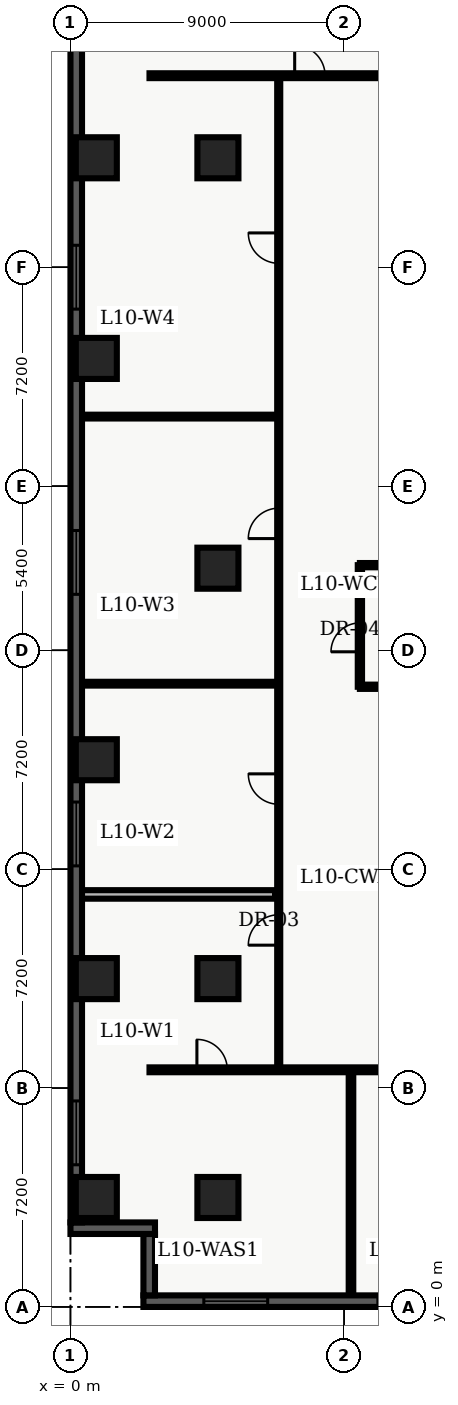
"""IFC4 building model, lengths in metres.
Left out: names, types, materials, properties, quantities, classifications, styles, units other than length and angle.
Written with IfcOpenShell. Run it as: python <this file> out.ifc"""

import sys

from ifc_helpers import new_model, entity, si_unit, converted_unit, direction, frame, origin_with_axes, origin_2d_with_axis, place, context, subcontext, project, spatial, polyline, rectangle, outline, extrude, element, fill, save


model = new_model("IFC4")
c1 = context("Model", 3, precision=1e-05, world=origin_with_axes(), true_north=direction((0.0, 1.0)))
c2 = subcontext(c1, "Body", "Model", "MODEL_VIEW")
j1 = project(units=[si_unit("LENGTHUNIT", "METRE"), converted_unit("PLANEANGLEUNIT", "DEGREE", entity("IfcPlaneAngleMeasure", 0.017), si_unit("PLANEANGLEUNIT", "RADIAN"), dimensions=[0, 0, 0, 0, 0, 0, 0])], contexts=[c1])
p1 = place(None, origin_with_axes())
s1 = spatial("IfcSite", under=j1, at=p1, CompositionType="ELEMENT")
p2 = place(p1, origin_with_axes())
s2 = spatial("IfcBuilding", under=s1, at=p2, CompositionType="ELEMENT")
p3 = place(p2, frame((0.0, 0.0, 44.4), z_axis=(0.0, 0.0, 1.0), x_axis=(1.0, 0.0, 0.0)))
s3 = spatial("IfcBuildingStorey", under=s2, at=p3, CompositionType="ELEMENT", Elevation=44.4)
for number, where, z_axis, x_axis in (
    (1, (4.85, 3.6, 0.0), (0.0, 0.0, 1.0), (1.0, 0.0, 0.0)),
    (2, (4.85, 10.8, 0.0), (0.0, 0.0, 1.0), (1.0, 0.0, 0.0)),
    (3, (4.85, 24.3, 0.0), (0.0, 0.0, 1.0), (1.0, 0.0, 0.0)),
    (4, (4.85, 37.8, 0.0), (0.0, 0.0, 1.0), (1.0, 0.0, 0.0)),
    (5, (0.85, 3.6, 0.0), (0.0, 0.0, 1.0), (1.0, 0.0, 0.0)),
    (6, (0.85, 10.8, 0.0), (0.0, 0.0, 1.0), (1.0, 0.0, 0.0)),
    (7, (0.85, 18.0, 0.0), (0.0, 0.0, 1.0), (1.0, 0.0, 0.0)),
    (8, (0.85, 31.2, 0.0), (0.0, 0.0, 1.0), (1.0, 0.0, 0.0)),
    (9, (0.85, 37.8, 0.0), (0.0, 0.0, 1.0), (1.0, 0.0, 0.0)),
):
    element("IfcColumn", number, at=place(p3, frame(where, z_axis=z_axis, x_axis=x_axis)), inside=s3, PredefinedType="COLUMN", context=c2, shape_type="SweptSolid", body=[
        extrude(rectangle(XDim=1.35, YDim=1.35, at=origin_2d_with_axis()), origin_with_axes(), (0.0, 0.0, 1.0), 3.9),
    ])
p4 = place(p3, frame((9.52, 20.4, 0.0), z_axis=(0.0, 0.0, 1.0), x_axis=(0.0, 1.0, 0.0)))
e10 = element("IfcWall", 10, at=p4, inside=s3, PredefinedType="PARTITIONING", context=c2, shape_type="SweptSolid", body=[
    extrude(outline(polyline([(0.0, -0.07), (4.0, -0.07), (4.0, 0.07), (0.0, 0.07), (0.0, -0.07)])), origin_with_axes(), (0.0, 0.0, 1.0), 2.7),
])
p5 = place(p4, frame((1.625, 0.0, 0.0), z_axis=(0.0, 0.0, 1.0), x_axis=(1.0, 0.0, 0.0)))
e11 = element("IfcOpeningElement", 11, at=p5, cuts=e10, PredefinedType="OPENING", context=c2, shape_type="SweptSolid", body=[
    extrude(rectangle(XDim=0.95, YDim=0.16, at=origin_2d_with_axis()), origin_with_axes(), (0.0, 0.0, 1.0), 2.15),
])
for number, where, z_axis, x_axis in (
    (12, (9.52, 20.4, 0.0), (0.0, 0.0, 1.0), (1.0, 0.0, 0.0)),
    (13, (9.52, 24.4, 0.0), (0.0, 0.0, 1.0), (1.0, 0.0, 0.0)),
):
    element("IfcWall", number, at=place(p3, frame(where, z_axis=z_axis, x_axis=x_axis)), inside=s3, PredefinedType="PARTITIONING", context=c2, shape_type="SweptSolid", body=[
        extrude(outline(polyline([(0.0, -0.07), (1.58, -0.07), (1.58, 0.07), (0.0, 0.07), (0.0, -0.07)])), origin_with_axes(), (0.0, 0.0, 1.0), 2.7),
    ])
p6 = place(p3, frame((2.6, 7.8, 0.0), z_axis=(0.0, 0.0, 1.0), x_axis=(1.0, 0.0, 0.0)))
e14 = element("IfcWall", 14, at=p6, inside=s3, PredefinedType="PARTITIONING", context=c2, shape_type="SweptSolid", body=[
    extrude(outline(polyline([(0.0, -0.08), (18.55, -0.08), (18.55, 0.08), (0.0, 0.08), (0.0, -0.08)])), origin_with_axes(), (0.0, 0.0, 1.0), 2.7),
])
p7 = place(p6, frame((2.059, 0.0, 0.0), z_axis=(0.0, 0.0, 1.0), x_axis=(1.0, 0.0, 0.0)))
e15 = element("IfcOpeningElement", 15, at=p7, cuts=e14, PredefinedType="OPENING", context=c2, shape_type="SweptSolid", body=[
    extrude(rectangle(XDim=1.0, YDim=0.18, at=origin_2d_with_axis()), origin_with_axes(), (0.0, 0.0, 1.0), 2.15),
])
p8 = place(p6, frame((10.516, 0.0, 0.0), z_axis=(0.0, 0.0, 1.0), x_axis=(1.0, 0.0, 0.0)))
e16 = element("IfcOpeningElement", 16, at=p8, cuts=e14, PredefinedType="OPENING", context=c2, shape_type="SweptSolid", body=[
    extrude(rectangle(XDim=1.2, YDim=0.18, at=origin_2d_with_axis()), origin_with_axes(), (0.0, 0.0, 1.0), 2.2),
])
p9 = place(p6, frame((16.453, 0.0, 0.0), z_axis=(0.0, 0.0, 1.0), x_axis=(1.0, 0.0, 0.0)))
e17 = element("IfcOpeningElement", 17, at=p9, cuts=e14, PredefinedType="OPENING", context=c2, shape_type="SweptSolid", body=[
    extrude(rectangle(XDim=1.0, YDim=0.18, at=origin_2d_with_axis()), origin_with_axes(), (0.0, 0.0, 1.0), 2.15),
])
p10 = place(p3, frame((2.6, 40.5, 0.0), z_axis=(0.0, 0.0, 1.0), x_axis=(1.0, 0.0, 0.0)))
e18 = element("IfcWall", 18, at=p10, inside=s3, PredefinedType="PARTITIONING", context=c2, shape_type="SweptSolid", body=[
    extrude(outline(polyline([(0.0, -0.08), (18.65, -0.08), (18.65, 0.08), (0.0, 0.08), (0.0, -0.08)])), origin_with_axes(), (0.0, 0.0, 1.0), 2.7),
])
p11 = place(p10, frame((5.275, 0.0, 0.0), z_axis=(0.0, 0.0, 1.0), x_axis=(1.0, 0.0, 0.0)))
e19 = element("IfcOpeningElement", 19, at=p11, cuts=e18, PredefinedType="OPENING", context=c2, shape_type="SweptSolid", body=[
    extrude(rectangle(XDim=1.0, YDim=0.18, at=origin_2d_with_axis()), origin_with_axes(), (0.0, 0.0, 1.0), 2.15),
])
p12 = place(p10, frame((12.61, 0.0, 0.0), z_axis=(0.0, 0.0, 1.0), x_axis=(1.0, 0.0, 0.0)))
e20 = element("IfcOpeningElement", 20, at=p12, cuts=e18, PredefinedType="OPENING", context=c2, shape_type="SweptSolid", body=[
    extrude(rectangle(XDim=1.2, YDim=0.18, at=origin_2d_with_axis()), origin_with_axes(), (0.0, 0.0, 1.0), 2.2),
])
p13 = place(p3, frame((6.85, 7.8, 0.0), z_axis=(0.0, 0.0, 1.0), x_axis=(0.0, 1.0, 0.0)))
e21 = element("IfcWall", 21, at=p13, inside=s3, PredefinedType="PARTITIONING", context=c2, shape_type="SweptSolid", body=[
    extrude(outline(polyline([(0.0, -0.05), (32.7, -0.05), (32.7, 0.05), (0.0, 0.05), (0.0, -0.05)])), origin_with_axes(), (0.0, 0.0, 1.0), 2.7),
])
p14 = place(p13, frame((4.6, 0.0, 0.0), z_axis=(0.0, 0.0, 1.0), x_axis=(1.0, 0.0, 0.0)))
e22 = element("IfcOpeningElement", 22, at=p14, cuts=e21, PredefinedType="OPENING", context=c2, shape_type="SweptSolid", body=[
    extrude(rectangle(XDim=1.0, YDim=0.12, at=origin_2d_with_axis()), origin_with_axes(), (0.0, 0.0, 1.0), 2.15),
])
p15 = place(p13, frame((9.235, 0.0, 0.0), z_axis=(0.0, 0.0, 1.0), x_axis=(1.0, 0.0, 0.0)))
e23 = element("IfcOpeningElement", 23, at=p15, cuts=e21, PredefinedType="OPENING", context=c2, shape_type="SweptSolid", body=[
    extrude(rectangle(XDim=1.0, YDim=0.12, at=origin_2d_with_axis()), origin_with_axes(), (0.0, 0.0, 1.0), 2.15),
])
p16 = place(p13, frame((17.974, 0.0, 0.0), z_axis=(0.0, 0.0, 1.0), x_axis=(1.0, 0.0, 0.0)))
e24 = element("IfcOpeningElement", 24, at=p16, cuts=e21, PredefinedType="OPENING", context=c2, shape_type="SweptSolid", body=[
    extrude(rectangle(XDim=1.0, YDim=0.12, at=origin_2d_with_axis()), origin_with_axes(), (0.0, 0.0, 1.0), 2.15),
])
p17 = place(p13, frame((27.029, 0.0, 0.0), z_axis=(0.0, 0.0, 1.0), x_axis=(1.0, 0.0, 0.0)))
e25 = element("IfcOpeningElement", 25, at=p17, cuts=e21, PredefinedType="OPENING", context=c2, shape_type="SweptSolid", body=[
    extrude(rectangle(XDim=1.0, YDim=0.12, at=origin_2d_with_axis()), origin_with_axes(), (0.0, 0.0, 1.0), 2.15),
])
p18 = place(p3, frame((0.375, 13.569, 0.0), z_axis=(0.0, 0.0, 1.0), x_axis=(1.0, 0.0, 0.0)))
e26 = element("IfcWall", 26, at=p18, inside=s3, PredefinedType="PARTITIONING", context=c2, shape_type="SweptSolid", body=[
    extrude(outline(polyline([(0.0, -0.14), (6.355, -0.14), (6.355, 0.14), (0.0, 0.14), (0.0, -0.14)])), origin_with_axes(), (0.0, 0.0, 1.0), 2.7),
])
for number, where, z_axis, x_axis in (
    (27, (0.375, 20.501, 0.0), (0.0, 0.0, 1.0), (1.0, 0.0, 0.0)),
    (28, (0.375, 29.287, 0.0), (0.0, 0.0, 1.0), (1.0, 0.0, 0.0)),
):
    element("IfcWall", number, at=place(p3, frame(where, z_axis=z_axis, x_axis=x_axis)), inside=s3, PredefinedType="PARTITIONING", context=c2, shape_type="SweptSolid", body=[
        extrude(outline(polyline([(0.0, -0.062), (6.355, -0.062), (6.355, 0.062), (0.0, 0.062), (0.0, -0.062)])), origin_with_axes(), (0.0, 0.0, 1.0), 2.7),
    ])
p19 = place(p3, frame((9.227, 0.36, 0.0), z_axis=(0.0, 0.0, 1.0), x_axis=(0.0, 1.0, 0.0)))
e29 = element("IfcWall", 29, at=p19, inside=s3, PredefinedType="PARTITIONING", context=c2, shape_type="SweptSolid", body=[
    extrude(outline(polyline([(0.0, -0.075), (7.34, -0.075), (7.34, 0.075), (0.0, 0.075), (0.0, -0.075)])), origin_with_axes(), (0.0, 0.0, 1.0), 2.7),
])
p20 = place(p3, frame((57.22, 0.19, 0.0), z_axis=(0.0, 0.0, 1.0), x_axis=(-1.0, 0.0, 0.0)))
e30 = element("IfcWall", 30, at=p20, inside=s3, PredefinedType="SOLIDWALL", context=c2, shape_type="SweptSolid", body=[
    extrude(outline(polyline([(0.0, -0.19), (54.82, -0.19), (54.82, 0.19), (0.0, 0.19), (0.0, -0.19)])), origin_with_axes(), (0.0, 0.0, 1.0), 3.66),
])
p21 = place(p20, frame((3.037, 0.0, 0.45), z_axis=(0.0, 0.0, 1.0), x_axis=(1.0, 0.0, 0.0)))
e31 = element("IfcOpeningElement", 31, at=p21, cuts=e30, PredefinedType="OPENING", context=c2, shape_type="SweptSolid", body=[
    extrude(rectangle(XDim=2.1, YDim=0.4, at=origin_2d_with_axis()), origin_with_axes(), (0.0, 0.0, 1.0), 2.2),
])
p22 = place(p20, frame((7.912, 0.0, 0.45), z_axis=(0.0, 0.0, 1.0), x_axis=(1.0, 0.0, 0.0)))
e32 = element("IfcOpeningElement", 32, at=p22, cuts=e30, PredefinedType="OPENING", context=c2, shape_type="SweptSolid", body=[
    extrude(rectangle(XDim=2.1, YDim=0.4, at=origin_2d_with_axis()), origin_with_axes(), (0.0, 0.0, 1.0), 2.2),
])
p23 = place(p20, frame((12.786, 0.0, 0.45), z_axis=(0.0, 0.0, 1.0), x_axis=(1.0, 0.0, 0.0)))
e33 = element("IfcOpeningElement", 33, at=p23, cuts=e30, PredefinedType="OPENING", context=c2, shape_type="SweptSolid", body=[
    extrude(rectangle(XDim=2.1, YDim=0.4, at=origin_2d_with_axis()), origin_with_axes(), (0.0, 0.0, 1.0), 2.2),
])
p24 = place(p20, frame((17.661, 0.0, 0.45), z_axis=(0.0, 0.0, 1.0), x_axis=(1.0, 0.0, 0.0)))
e34 = element("IfcOpeningElement", 34, at=p24, cuts=e30, PredefinedType="OPENING", context=c2, shape_type="SweptSolid", body=[
    extrude(rectangle(XDim=2.1, YDim=0.4, at=origin_2d_with_axis()), origin_with_axes(), (0.0, 0.0, 1.0), 2.2),
])
p25 = place(p20, frame((22.535, 0.0, 0.45), z_axis=(0.0, 0.0, 1.0), x_axis=(1.0, 0.0, 0.0)))
e35 = element("IfcOpeningElement", 35, at=p25, cuts=e30, PredefinedType="OPENING", context=c2, shape_type="SweptSolid", body=[
    extrude(rectangle(XDim=2.1, YDim=0.4, at=origin_2d_with_axis()), origin_with_axes(), (0.0, 0.0, 1.0), 2.2),
])
p26 = place(p20, frame((27.41, 0.0, 0.45), z_axis=(0.0, 0.0, 1.0), x_axis=(1.0, 0.0, 0.0)))
e36 = element("IfcOpeningElement", 36, at=p26, cuts=e30, PredefinedType="OPENING", context=c2, shape_type="SweptSolid", body=[
    extrude(rectangle(XDim=2.1, YDim=0.4, at=origin_2d_with_axis()), origin_with_axes(), (0.0, 0.0, 1.0), 2.2),
])
p27 = place(p20, frame((32.285, 0.0, 0.45), z_axis=(0.0, 0.0, 1.0), x_axis=(1.0, 0.0, 0.0)))
e37 = element("IfcOpeningElement", 37, at=p27, cuts=e30, PredefinedType="OPENING", context=c2, shape_type="SweptSolid", body=[
    extrude(rectangle(XDim=2.1, YDim=0.4, at=origin_2d_with_axis()), origin_with_axes(), (0.0, 0.0, 1.0), 2.2),
])
p28 = place(p20, frame((37.159, 0.0, 0.45), z_axis=(0.0, 0.0, 1.0), x_axis=(1.0, 0.0, 0.0)))
e38 = element("IfcOpeningElement", 38, at=p28, cuts=e30, PredefinedType="OPENING", context=c2, shape_type="SweptSolid", body=[
    extrude(rectangle(XDim=2.1, YDim=0.4, at=origin_2d_with_axis()), origin_with_axes(), (0.0, 0.0, 1.0), 2.2),
])
p29 = place(p20, frame((42.034, 0.0, 0.45), z_axis=(0.0, 0.0, 1.0), x_axis=(1.0, 0.0, 0.0)))
e39 = element("IfcOpeningElement", 39, at=p29, cuts=e30, PredefinedType="OPENING", context=c2, shape_type="SweptSolid", body=[
    extrude(rectangle(XDim=2.1, YDim=0.4, at=origin_2d_with_axis()), origin_with_axes(), (0.0, 0.0, 1.0), 2.2),
])
p30 = place(p20, frame((46.058, 0.0, 0.45), z_axis=(0.0, 0.0, 1.0), x_axis=(1.0, 0.0, 0.0)))
e40 = element("IfcOpeningElement", 40, at=p30, cuts=e30, PredefinedType="OPENING", context=c2, shape_type="SweptSolid", body=[
    extrude(rectangle(XDim=2.1, YDim=0.4, at=origin_2d_with_axis()), origin_with_axes(), (0.0, 0.0, 1.0), 2.2),
])
p31 = place(p20, frame((51.783, 0.0, 0.45), z_axis=(0.0, 0.0, 1.0), x_axis=(1.0, 0.0, 0.0)))
e41 = element("IfcOpeningElement", 41, at=p31, cuts=e30, PredefinedType="OPENING", context=c2, shape_type="SweptSolid", body=[
    extrude(rectangle(XDim=2.1, YDim=0.4, at=origin_2d_with_axis()), origin_with_axes(), (0.0, 0.0, 1.0), 2.2),
])
p32 = place(p3, frame((2.59, 0.38, 0.0), z_axis=(0.0, 0.0, 1.0), x_axis=(0.0, 1.0, 0.0)))
e42 = element("IfcWall", 42, at=p32, inside=s3, PredefinedType="SOLIDWALL", context=c2, shape_type="SweptSolid", body=[
    extrude(outline(polyline([(0.0, -0.19), (2.02, -0.19), (2.02, 0.19), (0.0, 0.19), (0.0, -0.19)])), origin_with_axes(), (0.0, 0.0, 1.0), 3.66),
])
p33 = place(p3, frame((2.78, 2.59, 0.0), z_axis=(0.0, 0.0, 1.0), x_axis=(-1.0, 0.0, 0.0)))
e43 = element("IfcWall", 43, at=p33, inside=s3, PredefinedType="SOLIDWALL", context=c2, shape_type="SweptSolid", body=[
    extrude(outline(polyline([(0.0, -0.19), (2.78, -0.19), (2.78, 0.19), (0.0, 0.19), (0.0, -0.19)])), origin_with_axes(), (0.0, 0.0, 1.0), 3.66),
])
p34 = place(p3, frame((0.19, 2.78, 0.0), z_axis=(0.0, 0.0, 1.0), x_axis=(0.0, 1.0, 0.0)))
e44 = element("IfcWall", 44, at=p34, inside=s3, PredefinedType="SOLIDWALL", context=c2, shape_type="SweptSolid", body=[
    extrude(outline(polyline([(0.0, -0.19), (43.42, -0.19), (43.42, 0.19), (0.0, 0.19), (0.0, -0.19)])), origin_with_axes(), (0.0, 0.0, 1.0), 3.66),
])
p35 = place(p34, frame((2.946, 0.0, 0.45), z_axis=(0.0, 0.0, 1.0), x_axis=(1.0, 0.0, 0.0)))
e45 = element("IfcOpeningElement", 45, at=p35, cuts=e44, PredefinedType="OPENING", context=c2, shape_type="SweptSolid", body=[
    extrude(rectangle(XDim=2.1, YDim=0.4, at=origin_2d_with_axis()), origin_with_axes(), (0.0, 0.0, 1.0), 2.2),
])
p36 = place(p34, frame((12.778, 0.0, 0.45), z_axis=(0.0, 0.0, 1.0), x_axis=(1.0, 0.0, 0.0)))
e46 = element("IfcOpeningElement", 46, at=p36, cuts=e44, PredefinedType="OPENING", context=c2, shape_type="SweptSolid", body=[
    extrude(rectangle(XDim=2.1, YDim=0.4, at=origin_2d_with_axis()), origin_with_axes(), (0.0, 0.0, 1.0), 2.2),
])
p37 = place(p34, frame((21.71, 0.0, 0.45), z_axis=(0.0, 0.0, 1.0), x_axis=(1.0, 0.0, 0.0)))
e47 = element("IfcOpeningElement", 47, at=p37, cuts=e44, PredefinedType="OPENING", context=c2, shape_type="SweptSolid", body=[
    extrude(rectangle(XDim=2.1, YDim=0.4, at=origin_2d_with_axis()), origin_with_axes(), (0.0, 0.0, 1.0), 2.2),
])
p38 = place(p34, frame((31.092, 0.0, 0.45), z_axis=(0.0, 0.0, 1.0), x_axis=(1.0, 0.0, 0.0)))
e48 = element("IfcOpeningElement", 48, at=p38, cuts=e44, PredefinedType="OPENING", context=c2, shape_type="SweptSolid", body=[
    extrude(rectangle(XDim=2.1, YDim=0.4, at=origin_2d_with_axis()), origin_with_axes(), (0.0, 0.0, 1.0), 2.2),
])
p39 = place(p34, frame((40.024, 0.0, 0.45), z_axis=(0.0, 0.0, 1.0), x_axis=(1.0, 0.0, 0.0)))
e49 = element("IfcOpeningElement", 49, at=p39, cuts=e44, PredefinedType="OPENING", context=c2, shape_type="SweptSolid", body=[
    extrude(rectangle(XDim=2.1, YDim=0.4, at=origin_2d_with_axis()), origin_with_axes(), (0.0, 0.0, 1.0), 2.2),
])
p40 = place(p4, frame((1.625, 0.0, 0.0), z_axis=(0.0, 0.0, 1.0), x_axis=(1.0, 0.0, 0.0)))
e50 = element("IfcDoor", 50, at=p40, inside=s3, OperationType="SINGLE_SWING_LEFT", PredefinedType="DOOR", context=c2, shape_type="SweptSolid", body=[
    extrude(rectangle(XDim=0.95, YDim=0.084, at=origin_2d_with_axis()), origin_with_axes(), (0.0, 0.0, 1.0), 2.15),
])
fill(e11, e50)
p41 = place(p13, frame((4.6, 0.0, 0.0), z_axis=(0.0, 0.0, 1.0), x_axis=(1.0, 0.0, 0.0)))
e51 = element("IfcDoor", 51, at=p41, inside=s3, OperationType="SINGLE_SWING_LEFT", PredefinedType="DOOR", context=c2, shape_type="SweptSolid", body=[
    extrude(rectangle(XDim=1.0, YDim=0.06, at=origin_2d_with_axis()), origin_with_axes(), (0.0, 0.0, 1.0), 2.15),
])
fill(e22, e51)
p42 = place(p13, frame((9.235, 0.0, 0.0), z_axis=(0.0, 0.0, 1.0), x_axis=(1.0, 0.0, 0.0)))
e52 = element("IfcDoor", 52, at=p42, inside=s3, OperationType="SINGLE_SWING_RIGHT", PredefinedType="DOOR", context=c2, shape_type="SweptSolid", body=[
    extrude(rectangle(XDim=1.0, YDim=0.06, at=origin_2d_with_axis()), origin_with_axes(), (0.0, 0.0, 1.0), 2.15),
])
fill(e23, e52)
p43 = place(p13, frame((17.974, 0.0, 0.0), z_axis=(0.0, 0.0, 1.0), x_axis=(1.0, 0.0, 0.0)))
e53 = element("IfcDoor", 53, at=p43, inside=s3, OperationType="SINGLE_SWING_LEFT", PredefinedType="DOOR", context=c2, shape_type="SweptSolid", body=[
    extrude(rectangle(XDim=1.0, YDim=0.06, at=origin_2d_with_axis()), origin_with_axes(), (0.0, 0.0, 1.0), 2.15),
])
fill(e24, e53)
p44 = place(p13, frame((27.029, 0.0, 0.0), z_axis=(0.0, 0.0, 1.0), x_axis=(1.0, 0.0, 0.0)))
e54 = element("IfcDoor", 54, at=p44, inside=s3, OperationType="SINGLE_SWING_RIGHT", PredefinedType="DOOR", context=c2, shape_type="SweptSolid", body=[
    extrude(rectangle(XDim=1.0, YDim=0.06, at=origin_2d_with_axis()), origin_with_axes(), (0.0, 0.0, 1.0), 2.15),
])
fill(e25, e54)
p45 = place(p6, frame((2.059, 0.0, 0.0), z_axis=(0.0, 0.0, 1.0), x_axis=(1.0, 0.0, 0.0)))
e55 = element("IfcDoor", 55, at=p45, inside=s3, OperationType="SINGLE_SWING_LEFT", PredefinedType="DOOR", context=c2, shape_type="SweptSolid", body=[
    extrude(rectangle(XDim=1.0, YDim=0.09, at=origin_2d_with_axis()), origin_with_axes(), (0.0, 0.0, 1.0), 2.15),
])
fill(e15, e55)
p46 = place(p10, frame((5.275, 0.0, 0.0), z_axis=(0.0, 0.0, 1.0), x_axis=(1.0, 0.0, 0.0)))
e56 = element("IfcDoor", 56, at=p46, inside=s3, OperationType="SINGLE_SWING_LEFT", PredefinedType="DOOR", context=c2, shape_type="SweptSolid", body=[
    extrude(rectangle(XDim=1.0, YDim=0.09, at=origin_2d_with_axis()), origin_with_axes(), (0.0, 0.0, 1.0), 2.15),
])
fill(e19, e56)
p47 = place(p20, frame((46.058, 0.0, 0.45), z_axis=(0.0, 0.0, 1.0), x_axis=(1.0, 0.0, 0.0)))
e57 = element("IfcWindow", 57, at=p47, inside=s3, PredefinedType="WINDOW", context=c2, shape_type="SweptSolid", body=[
    extrude(rectangle(XDim=2.1, YDim=0.09, at=origin_2d_with_axis()), origin_with_axes(), (0.0, 0.0, 1.0), 2.2),
])
fill(e40, e57)
p48 = place(p20, frame((51.783, 0.0, 0.45), z_axis=(0.0, 0.0, 1.0), x_axis=(1.0, 0.0, 0.0)))
e58 = element("IfcWindow", 58, at=p48, inside=s3, PredefinedType="WINDOW", context=c2, shape_type="SweptSolid", body=[
    extrude(rectangle(XDim=2.1, YDim=0.09, at=origin_2d_with_axis()), origin_with_axes(), (0.0, 0.0, 1.0), 2.2),
])
fill(e41, e58)
p49 = place(p34, frame((2.946, 0.0, 0.45), z_axis=(0.0, 0.0, 1.0), x_axis=(1.0, 0.0, 0.0)))
e59 = element("IfcWindow", 59, at=p49, inside=s3, PredefinedType="WINDOW", context=c2, shape_type="SweptSolid", body=[
    extrude(rectangle(XDim=2.1, YDim=0.09, at=origin_2d_with_axis()), origin_with_axes(), (0.0, 0.0, 1.0), 2.2),
])
fill(e45, e59)
p50 = place(p34, frame((12.778, 0.0, 0.45), z_axis=(0.0, 0.0, 1.0), x_axis=(1.0, 0.0, 0.0)))
e60 = element("IfcWindow", 60, at=p50, inside=s3, PredefinedType="WINDOW", context=c2, shape_type="SweptSolid", body=[
    extrude(rectangle(XDim=2.1, YDim=0.09, at=origin_2d_with_axis()), origin_with_axes(), (0.0, 0.0, 1.0), 2.2),
])
fill(e46, e60)
p51 = place(p34, frame((21.71, 0.0, 0.45), z_axis=(0.0, 0.0, 1.0), x_axis=(1.0, 0.0, 0.0)))
e61 = element("IfcWindow", 61, at=p51, inside=s3, PredefinedType="WINDOW", context=c2, shape_type="SweptSolid", body=[
    extrude(rectangle(XDim=2.1, YDim=0.09, at=origin_2d_with_axis()), origin_with_axes(), (0.0, 0.0, 1.0), 2.2),
])
fill(e47, e61)
p52 = place(p34, frame((31.092, 0.0, 0.45), z_axis=(0.0, 0.0, 1.0), x_axis=(1.0, 0.0, 0.0)))
e62 = element("IfcWindow", 62, at=p52, inside=s3, PredefinedType="WINDOW", context=c2, shape_type="SweptSolid", body=[
    extrude(rectangle(XDim=2.1, YDim=0.09, at=origin_2d_with_axis()), origin_with_axes(), (0.0, 0.0, 1.0), 2.2),
])
fill(e48, e62)
save(model, sys.argv[1])
